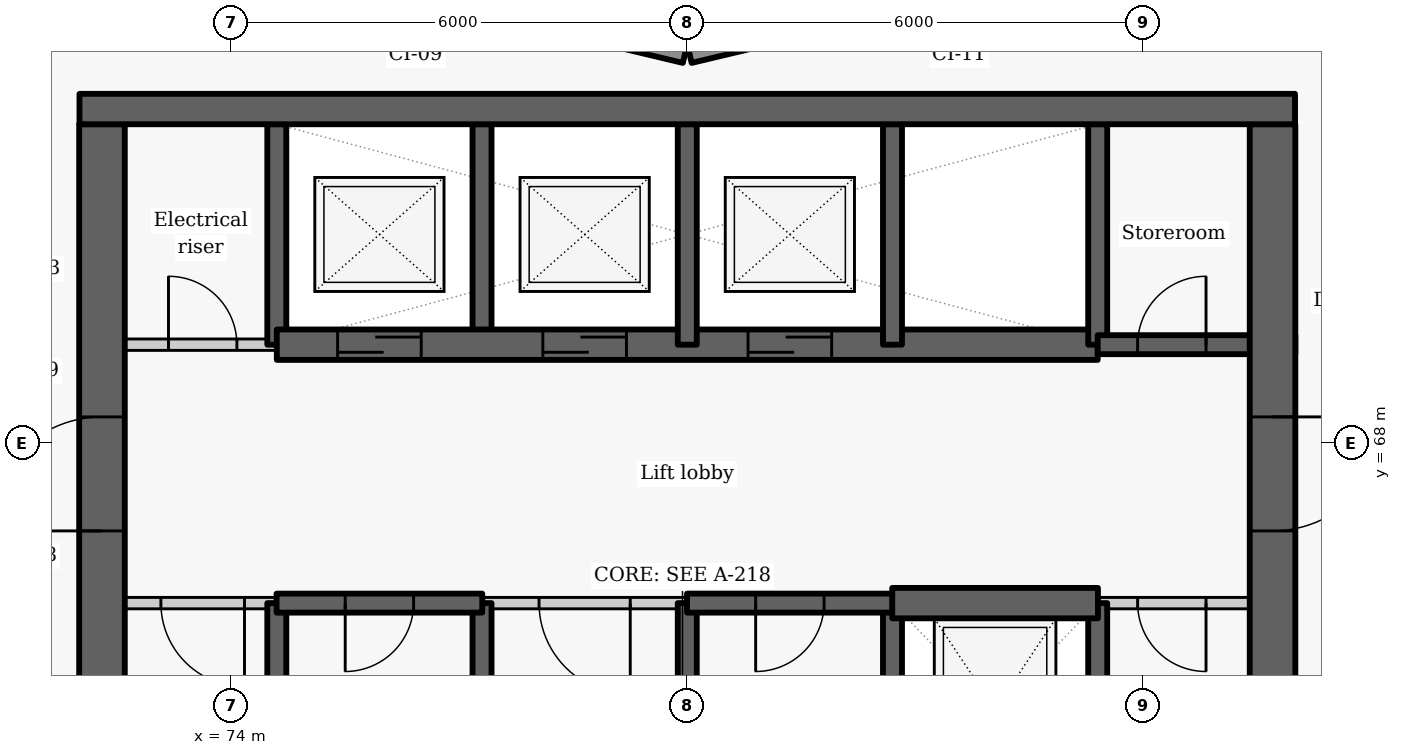
"""IFC4 building model, lengths in metres.
Left out: names, types, materials, properties, quantities, classifications, styles, units other than length and angle.
Written with IfcOpenShell. Run it as: python <this file> out.ifc"""

import sys

from ifc_helpers import new_model, si_unit, direction, frame, frame_2d, origin, place, context, subcontext, project, spatial, rectangle, extrude, element, fill, save


model = new_model("IFC4")
c1 = context("Model", 3, precision=1e-05, world=origin(), true_north=direction((0.0, 1.0)))
c2 = subcontext(c1, "Body", "Model", "MODEL_VIEW")
j1 = project(units=[si_unit("LENGTHUNIT", "METRE"), si_unit("PLANEANGLEUNIT", "RADIAN")], contexts=[c1])
p1 = place(None, origin())
s1 = spatial("IfcSite", under=j1, at=p1, CompositionType="ELEMENT")
p2 = place(p1, origin())
s2 = spatial("IfcBuilding", under=s1, at=p2, CompositionType="ELEMENT")
p3 = place(p2, frame((0.0, 0.0, 87.6)))
s3 = spatial("IfcBuildingStorey", under=s2, at=p3, CompositionType="ELEMENT", Elevation=87.6)
for number, where, z_axis, x_axis in (
    (1, (83.186, 73.881, 0.0), (0.0, 0.0, 1.0), (-0.973, -0.232, 0.0)),
    (2, (79.971, 73.128, 0.0), (0.0, 0.0, 1.0), (-0.973, 0.232, 0.0)),
):
    element("IfcWall", number, at=place(p3, frame(where, z_axis=z_axis, x_axis=x_axis)), inside=s3, PredefinedType="SOLIDWALL", context=c2, shape_type="SweptSolid", body=[
        extrude(rectangle(XDim=3.246, YDim=0.25, at=frame_2d((1.623, 0.0))), origin(), (0.0, 0.0, 1.0), 2.425),
    ])
p4 = place(p3, frame((74.6, 63.1, -0.275), z_axis=(0.0, 0.0, 1.0), x_axis=(0.0, 1.0, 0.0)))
e3 = element("IfcWall", 3, at=p4, inside=s3, PredefinedType="SHEAR", context=c2, shape_type="SweptSolid", body=[
    extrude(rectangle(XDim=2.8, YDim=0.25, at=frame_2d((1.4, 0.0))), origin(), (0.0, 0.0, 1.0), 3.3),
])
p5 = place(p3, frame((74.6, 69.3, -0.275), z_axis=(0.0, 0.0, 1.0), x_axis=(0.0, 1.0, 0.0)))
e4 = element("IfcWall", 4, at=p5, inside=s3, PredefinedType="SHEAR", context=c2, shape_type="SweptSolid", body=[
    extrude(rectangle(XDim=2.9, YDim=0.25, at=frame_2d((1.45, 0.0))), origin(), (0.0, 0.0, 1.0), 3.3),
])
p6 = place(p3, frame((72.0, 69.3, 0.0), z_axis=(0.0, 0.0, 1.0), x_axis=(1.0, 0.0, 0.0)))
e5 = element("IfcWall", 5, at=p6, inside=s3, PredefinedType="PARTITIONING", context=c2, shape_type="SweptSolid", body=[
    extrude(rectangle(XDim=2.6, YDim=0.15, at=frame_2d((1.3, 0.0))), origin(), (0.0, 0.0, 1.0), 3.025),
])
p7 = place(p6, frame((1.175, 0.0, 0.0)))
e6 = element("IfcOpeningElement", 6, at=p7, cuts=e5, PredefinedType="OPENING", context=c2, shape_type="SweptSolid", body=[
    extrude(rectangle(XDim=0.9, YDim=2.1, at=frame_2d((0.45, 1.05))), frame((0.0, 0.085, 0.0), z_axis=(0.0, -1.0, 0.0), x_axis=(1.0, 0.0, 0.0)), (0.0, 0.0, 1.0), 0.17),
])
p8 = place(p3, frame((72.3, 63.1, -0.275), z_axis=(0.0, 0.0, 1.0), x_axis=(0.0, 1.0, 0.0)))
e7 = element("IfcWall", 7, at=p8, inside=s3, PredefinedType="SHEAR", context=c2, shape_type="SweptSolid", body=[
    extrude(rectangle(XDim=9.1, YDim=0.6, at=frame_2d((4.55, 0.0))), origin(), (0.0, 0.0, 1.0), 3.3),
])
p9 = place(p8, frame((3.75, 0.0, 0.275)))
e8 = element("IfcOpeningElement", 8, at=p9, cuts=e7, PredefinedType="OPENING", context=c2, shape_type="SweptSolid", body=[
    extrude(rectangle(XDim=1.5, YDim=2.1, at=frame_2d((0.75, 1.05))), frame((0.0, 0.31, 0.0), z_axis=(0.0, -1.0, 0.0), x_axis=(1.0, 0.0, 0.0)), (0.0, 0.0, 1.0), 0.62),
])
p10 = place(p3, frame((77.3, 63.1, -0.275), z_axis=(0.0, 0.0, 1.0), x_axis=(0.0, 1.0, 0.0)))
e9 = element("IfcWall", 9, at=p10, inside=s3, PredefinedType="SHEAR", context=c2, shape_type="SweptSolid", body=[
    extrude(rectangle(XDim=2.8, YDim=0.25, at=frame_2d((1.4, 0.0))), origin(), (0.0, 0.0, 1.0), 3.3),
])
p11 = place(p3, frame((77.3, 69.3, -0.275), z_axis=(0.0, 0.0, 1.0), x_axis=(0.0, 1.0, 0.0)))
e10 = element("IfcWall", 10, at=p11, inside=s3, PredefinedType="SHEAR", context=c2, shape_type="SweptSolid", body=[
    extrude(rectangle(XDim=2.9, YDim=0.25, at=frame_2d((1.45, 0.0))), origin(), (0.0, 0.0, 1.0), 3.3),
])
p12 = place(p3, frame((74.6, 69.3, -0.275), z_axis=(0.0, 0.0, 1.0), x_axis=(1.0, 0.0, 0.0)))
e11 = element("IfcWall", 11, at=p12, inside=s3, PredefinedType="SHEAR", context=c2, shape_type="SweptSolid", body=[
    extrude(rectangle(XDim=10.8, YDim=0.4, at=frame_2d((5.4, 0.0))), origin(), (0.0, 0.0, 1.0), 3.3),
])
p13 = place(p12, frame((0.8, 0.0, 0.275)))
e12 = element("IfcOpeningElement", 12, at=p13, cuts=e11, PredefinedType="OPENING", context=c2, shape_type="SweptSolid", body=[
    extrude(rectangle(XDim=1.1, YDim=2.1, at=frame_2d((0.55, 1.05))), frame((0.0, 0.21, 0.0), z_axis=(0.0, -1.0, 0.0), x_axis=(1.0, 0.0, 0.0)), (0.0, 0.0, 1.0), 0.42),
])
p14 = place(p12, frame((3.5, 0.0, 0.275)))
e13 = element("IfcOpeningElement", 13, at=p14, cuts=e11, PredefinedType="OPENING", context=c2, shape_type="SweptSolid", body=[
    extrude(rectangle(XDim=1.1, YDim=2.1, at=frame_2d((0.55, 1.05))), frame((0.0, 0.21, 0.0), z_axis=(0.0, -1.0, 0.0), x_axis=(1.0, 0.0, 0.0)), (0.0, 0.0, 1.0), 0.42),
])
p15 = place(p12, frame((6.2, 0.0, 0.275)))
e14 = element("IfcOpeningElement", 14, at=p15, cuts=e11, PredefinedType="OPENING", context=c2, shape_type="SweptSolid", body=[
    extrude(rectangle(XDim=1.1, YDim=2.1, at=frame_2d((0.55, 1.05))), frame((0.0, 0.21, 0.0), z_axis=(0.0, -1.0, 0.0), x_axis=(1.0, 0.0, 0.0)), (0.0, 0.0, 1.0), 0.42),
])
p16 = place(p3, frame((80.0, 63.1, -0.275), z_axis=(0.0, 0.0, 1.0), x_axis=(0.0, 1.0, 0.0)))
e15 = element("IfcWall", 15, at=p16, inside=s3, PredefinedType="SHEAR", context=c2, shape_type="SweptSolid", body=[
    extrude(rectangle(XDim=2.8, YDim=0.25, at=frame_2d((1.4, 0.0))), origin(), (0.0, 0.0, 1.0), 3.3),
])
p17 = place(p3, frame((80.0, 69.3, -0.275), z_axis=(0.0, 0.0, 1.0), x_axis=(0.0, 1.0, 0.0)))
e16 = element("IfcWall", 16, at=p17, inside=s3, PredefinedType="SHEAR", context=c2, shape_type="SweptSolid", body=[
    extrude(rectangle(XDim=2.9, YDim=0.25, at=frame_2d((1.45, 0.0))), origin(), (0.0, 0.0, 1.0), 3.3),
])
p18 = place(p3, frame((82.7, 63.1, -0.275), z_axis=(0.0, 0.0, 1.0), x_axis=(0.0, 1.0, 0.0)))
e17 = element("IfcWall", 17, at=p18, inside=s3, PredefinedType="SHEAR", context=c2, shape_type="SweptSolid", body=[
    extrude(rectangle(XDim=2.8, YDim=0.25, at=frame_2d((1.4, 0.0))), origin(), (0.0, 0.0, 1.0), 3.3),
])
p19 = place(p3, frame((82.7, 69.3, -0.275), z_axis=(0.0, 0.0, 1.0), x_axis=(0.0, 1.0, 0.0)))
e18 = element("IfcWall", 18, at=p19, inside=s3, PredefinedType="SHEAR", context=c2, shape_type="SweptSolid", body=[
    extrude(rectangle(XDim=2.9, YDim=0.25, at=frame_2d((1.45, 0.0))), origin(), (0.0, 0.0, 1.0), 3.3),
])
p20 = place(p3, frame((85.4, 63.1, -0.275), z_axis=(0.0, 0.0, 1.0), x_axis=(0.0, 1.0, 0.0)))
e19 = element("IfcWall", 19, at=p20, inside=s3, PredefinedType="SHEAR", context=c2, shape_type="SweptSolid", body=[
    extrude(rectangle(XDim=2.8, YDim=0.25, at=frame_2d((1.4, 0.0))), origin(), (0.0, 0.0, 1.0), 3.3),
])
p21 = place(p3, frame((85.4, 69.3, -0.275), z_axis=(0.0, 0.0, 1.0), x_axis=(0.0, 1.0, 0.0)))
e20 = element("IfcWall", 20, at=p21, inside=s3, PredefinedType="SHEAR", context=c2, shape_type="SweptSolid", body=[
    extrude(rectangle(XDim=2.9, YDim=0.25, at=frame_2d((1.45, 0.0))), origin(), (0.0, 0.0, 1.0), 3.3),
])
p22 = place(p3, frame((85.4, 69.3, -0.275), z_axis=(0.0, 0.0, 1.0), x_axis=(1.0, 0.0, 0.0)))
e21 = element("IfcWall", 21, at=p22, inside=s3, PredefinedType="SHEAR", context=c2, shape_type="SweptSolid", body=[
    extrude(rectangle(XDim=2.6, YDim=0.25, at=frame_2d((1.3, 0.0))), origin(), (0.0, 0.0, 1.0), 3.3),
])
p23 = place(p22, frame((0.525, 0.0, 0.275)))
e22 = element("IfcOpeningElement", 22, at=p23, cuts=e21, PredefinedType="OPENING", context=c2, shape_type="SweptSolid", body=[
    extrude(rectangle(XDim=0.9, YDim=2.1, at=frame_2d((0.45, 1.05))), frame((0.0, 0.135, 0.0), z_axis=(0.0, -1.0, 0.0), x_axis=(1.0, 0.0, 0.0)), (0.0, 0.0, 1.0), 0.27),
])
p24 = place(p3, frame((87.7, 72.2, -0.275), z_axis=(0.0, 0.0, 1.0), x_axis=(0.0, -1.0, 0.0)))
e23 = element("IfcWall", 23, at=p24, inside=s3, PredefinedType="SHEAR", context=c2, shape_type="SweptSolid", body=[
    extrude(rectangle(XDim=15.6, YDim=0.6, at=frame_2d((7.8, 0.0))), origin(), (0.0, 0.0, 1.0), 3.3),
])
p25 = place(p24, frame((3.85, 0.0, 0.275)))
e24 = element("IfcOpeningElement", 24, at=p25, cuts=e23, PredefinedType="OPENING", context=c2, shape_type="SweptSolid", body=[
    extrude(rectangle(XDim=1.5, YDim=2.1, at=frame_2d((0.75, 1.05))), frame((0.0, 0.31, 0.0), z_axis=(0.0, -1.0, 0.0), x_axis=(1.0, 0.0, 0.0)), (0.0, 0.0, 1.0), 0.62),
])
p26 = place(p24, frame((11.8, 0.0, 0.275)))
e25 = element("IfcOpeningElement", 25, at=p26, cuts=e23, PredefinedType="OPENING", context=c2, shape_type="SweptSolid", body=[
    extrude(rectangle(XDim=1.1, YDim=2.1, at=frame_2d((0.55, 1.05))), frame((0.0, 0.31, 0.0), z_axis=(0.0, -1.0, 0.0), x_axis=(1.0, 0.0, 0.0)), (0.0, 0.0, 1.0), 0.62),
])
p27 = place(p3, frame((74.603, 65.9, 0.0), z_axis=(0.0, 0.0, 1.0), x_axis=(-1.0, 0.0, 0.0)))
e26 = element("IfcWall", 26, at=p27, inside=s3, PredefinedType="PARTITIONING", context=c2, shape_type="SweptSolid", body=[
    extrude(rectangle(XDim=2.603, YDim=0.15, at=frame_2d((1.302, 0.0))), origin(), (0.0, 0.0, 1.0), 3.025),
])
p28 = place(p27, frame((0.428, 0.0, 0.0)))
e27 = element("IfcOpeningElement", 27, at=p28, cuts=e26, PredefinedType="OPENING", context=c2, shape_type="SweptSolid", body=[
    extrude(rectangle(XDim=1.1, YDim=2.1, at=frame_2d((0.55, 1.05))), frame((0.0, 0.085, 0.0), z_axis=(0.0, -1.0, 0.0), x_axis=(1.0, 0.0, 0.0)), (0.0, 0.0, 1.0), 0.17),
])
p29 = place(p3, frame((80.003, 65.9, 0.0), z_axis=(0.0, 0.0, 1.0), x_axis=(-1.0, 0.0, 0.0)))
e28 = element("IfcWall", 28, at=p29, inside=s3, PredefinedType="PARTITIONING", context=c2, shape_type="SweptSolid", body=[
    extrude(rectangle(XDim=2.706, YDim=0.15, at=frame_2d((1.353, 0.0))), origin(), (0.0, 0.0, 1.0), 3.025),
])
p30 = place(p29, frame((0.753, 0.0, 0.0)))
e29 = element("IfcOpeningElement", 29, at=p30, cuts=e28, PredefinedType="OPENING", context=c2, shape_type="SweptSolid", body=[
    extrude(rectangle(XDim=1.2, YDim=2.1, at=frame_2d((0.6, 1.05))), frame((0.0, 0.085, 0.0), z_axis=(0.0, -1.0, 0.0), x_axis=(1.0, 0.0, 0.0)), (0.0, 0.0, 1.0), 0.17),
])
p31 = place(p3, frame((88.0, 65.9, 0.0), z_axis=(0.0, 0.0, 1.0), x_axis=(-1.0, 0.0, 0.0)))
e30 = element("IfcWall", 30, at=p31, inside=s3, PredefinedType="PARTITIONING", context=c2, shape_type="SweptSolid", body=[
    extrude(rectangle(XDim=2.603, YDim=0.15, at=frame_2d((1.302, 0.0))), origin(), (0.0, 0.0, 1.0), 3.025),
])
p32 = place(p31, frame((1.175, 0.0, 0.0)))
e31 = element("IfcOpeningElement", 31, at=p32, cuts=e30, PredefinedType="OPENING", context=c2, shape_type="SweptSolid", body=[
    extrude(rectangle(XDim=0.9, YDim=2.1, at=frame_2d((0.45, 1.05))), frame((0.0, 0.085, 0.0), z_axis=(0.0, -1.0, 0.0), x_axis=(1.0, 0.0, 0.0)), (0.0, 0.0, 1.0), 0.17),
])
p33 = place(p3, frame((77.303, 65.9, -0.275), z_axis=(0.0, 0.0, 1.0), x_axis=(-1.0, 0.0, 0.0)))
e32 = element("IfcWall", 32, at=p33, inside=s3, PredefinedType="SHEAR", context=c2, shape_type="SweptSolid", body=[
    extrude(rectangle(XDim=2.706, YDim=0.25, at=frame_2d((1.353, 0.0))), origin(), (0.0, 0.0, 1.0), 3.3),
])
p34 = place(p33, frame((0.903, 0.0, 0.275)))
e33 = element("IfcOpeningElement", 33, at=p34, cuts=e32, PredefinedType="OPENING", context=c2, shape_type="SweptSolid", body=[
    extrude(rectangle(XDim=0.9, YDim=2.1, at=frame_2d((0.45, 1.05))), frame((0.0, 0.135, 0.0), z_axis=(0.0, -1.0, 0.0), x_axis=(1.0, 0.0, 0.0)), (0.0, 0.0, 1.0), 0.27),
])
p35 = place(p3, frame((82.703, 65.9, -0.275), z_axis=(0.0, 0.0, 1.0), x_axis=(-1.0, 0.0, 0.0)))
e34 = element("IfcWall", 34, at=p35, inside=s3, PredefinedType="SHEAR", context=c2, shape_type="SweptSolid", body=[
    extrude(rectangle(XDim=2.706, YDim=0.25, at=frame_2d((1.353, 0.0))), origin(), (0.0, 0.0, 1.0), 3.3),
])
p36 = place(p35, frame((0.903, 0.0, 0.275)))
e35 = element("IfcOpeningElement", 35, at=p36, cuts=e34, PredefinedType="OPENING", context=c2, shape_type="SweptSolid", body=[
    extrude(rectangle(XDim=0.9, YDim=2.1, at=frame_2d((0.45, 1.05))), frame((0.0, 0.135, 0.0), z_axis=(0.0, -1.0, 0.0), x_axis=(1.0, 0.0, 0.0)), (0.0, 0.0, 1.0), 0.27),
])
p37 = place(p3, frame((82.697, 65.9, -0.275), z_axis=(0.0, 0.0, 1.0), x_axis=(1.0, 0.0, 0.0)))
e36 = element("IfcWall", 36, at=p37, inside=s3, PredefinedType="SHEAR", context=c2, shape_type="SweptSolid", body=[
    extrude(rectangle(XDim=2.706, YDim=0.4, at=frame_2d((1.353, 0.0))), origin(), (0.0, 0.0, 1.0), 3.3),
])
p38 = place(p3, frame((72.004, 72.4, -0.275), z_axis=(0.0, 0.0, 1.0), x_axis=(1.0, 0.0, 0.0)))
e37 = element("IfcWall", 37, at=p38, inside=s3, PredefinedType="SHEAR", context=c2, shape_type="SweptSolid", body=[
    extrude(rectangle(XDim=15.992, YDim=0.4, at=frame_2d((7.996, 0.0))), origin(), (0.0, 0.0, 1.0), 3.3),
])
p39 = place(p7, origin())
e38 = element("IfcDoor", 38, at=p39, inside=s3, OperationType="SINGLE_SWING_LEFT", PredefinedType="DOOR", context=c2, shape_type="SweptSolid", body=[
    extrude(rectangle(XDim=0.9, YDim=2.1, at=frame_2d((0.45, 1.05))), frame((0.0, 0.025, 0.0), z_axis=(0.0, -1.0, 0.0), x_axis=(1.0, 0.0, 0.0)), (0.0, 0.0, 1.0), 0.05),
])
fill(e6, e38)
p40 = place(p13, origin())
e39 = element("IfcDoor", 39, at=p40, inside=s3, OperationType="SLIDING_TO_LEFT", PredefinedType="DOOR", context=c2, shape_type="SweptSolid", body=[
    extrude(rectangle(XDim=1.1, YDim=2.1, at=frame_2d((0.55, 1.05))), frame((0.0, 0.025, 0.0), z_axis=(0.0, -1.0, 0.0), x_axis=(1.0, 0.0, 0.0)), (0.0, 0.0, 1.0), 0.05),
])
fill(e12, e39)
p41 = place(p14, origin())
e40 = element("IfcDoor", 40, at=p41, inside=s3, OperationType="SLIDING_TO_LEFT", PredefinedType="DOOR", context=c2, shape_type="SweptSolid", body=[
    extrude(rectangle(XDim=1.1, YDim=2.1, at=frame_2d((0.55, 1.05))), frame((0.0, 0.025, 0.0), z_axis=(0.0, -1.0, 0.0), x_axis=(1.0, 0.0, 0.0)), (0.0, 0.0, 1.0), 0.05),
])
fill(e13, e40)
p42 = place(p15, origin())
e41 = element("IfcDoor", 41, at=p42, inside=s3, OperationType="SLIDING_TO_LEFT", PredefinedType="DOOR", context=c2, shape_type="SweptSolid", body=[
    extrude(rectangle(XDim=1.1, YDim=2.1, at=frame_2d((0.55, 1.05))), frame((0.0, 0.025, 0.0), z_axis=(0.0, -1.0, 0.0), x_axis=(1.0, 0.0, 0.0)), (0.0, 0.0, 1.0), 0.05),
])
fill(e14, e41)
p43 = place(p23, origin())
e42 = element("IfcDoor", 42, at=p43, inside=s3, OperationType="SINGLE_SWING_RIGHT", PredefinedType="DOOR", context=c2, shape_type="SweptSolid", body=[
    extrude(rectangle(XDim=0.9, YDim=2.1, at=frame_2d((0.45, 1.05))), frame((0.0, 0.025, 0.0), z_axis=(0.0, -1.0, 0.0), x_axis=(1.0, 0.0, 0.0)), (0.0, 0.0, 1.0), 0.05),
])
fill(e22, e42)
p44 = place(p28, origin())
e43 = element("IfcDoor", 43, at=p44, inside=s3, OperationType="SINGLE_SWING_LEFT", PredefinedType="DOOR", context=c2, shape_type="SweptSolid", body=[
    extrude(rectangle(XDim=1.1, YDim=2.1, at=frame_2d((0.55, 1.05))), frame((0.0, 0.025, 0.0), z_axis=(0.0, -1.0, 0.0), x_axis=(1.0, 0.0, 0.0)), (0.0, 0.0, 1.0), 0.05),
])
fill(e27, e43)
p45 = place(p34, origin())
e44 = element("IfcDoor", 44, at=p45, inside=s3, OperationType="SINGLE_SWING_RIGHT", PredefinedType="DOOR", context=c2, shape_type="SweptSolid", body=[
    extrude(rectangle(XDim=0.9, YDim=2.1, at=frame_2d((0.45, 1.05))), frame((0.0, 0.025, 0.0), z_axis=(0.0, -1.0, 0.0), x_axis=(1.0, 0.0, 0.0)), (0.0, 0.0, 1.0), 0.05),
])
fill(e33, e44)
p46 = place(p30, origin())
e45 = element("IfcDoor", 45, at=p46, inside=s3, OperationType="DOUBLE_DOOR_SINGLE_SWING", PredefinedType="DOOR", context=c2, shape_type="SweptSolid", body=[
    extrude(rectangle(XDim=1.2, YDim=2.1, at=frame_2d((0.6, 1.05))), frame((0.0, 0.025, 0.0), z_axis=(0.0, -1.0, 0.0), x_axis=(1.0, 0.0, 0.0)), (0.0, 0.0, 1.0), 0.05),
])
fill(e29, e45)
p47 = place(p36, origin())
e46 = element("IfcDoor", 46, at=p47, inside=s3, OperationType="SINGLE_SWING_RIGHT", PredefinedType="DOOR", context=c2, shape_type="SweptSolid", body=[
    extrude(rectangle(XDim=0.9, YDim=2.1, at=frame_2d((0.45, 1.05))), frame((0.0, 0.025, 0.0), z_axis=(0.0, -1.0, 0.0), x_axis=(1.0, 0.0, 0.0)), (0.0, 0.0, 1.0), 0.05),
])
fill(e35, e46)
p48 = place(p32, origin())
e47 = element("IfcDoor", 47, at=p48, inside=s3, OperationType="SINGLE_SWING_LEFT", PredefinedType="DOOR", context=c2, shape_type="SweptSolid", body=[
    extrude(rectangle(XDim=0.9, YDim=2.1, at=frame_2d((0.45, 1.05))), frame((0.0, 0.025, 0.0), z_axis=(0.0, -1.0, 0.0), x_axis=(1.0, 0.0, 0.0)), (0.0, 0.0, 1.0), 0.05),
])
fill(e31, e47)
p49 = place(p25, origin())
e48 = element("IfcDoor", 48, at=p49, inside=s3, OperationType="DOUBLE_DOOR_SINGLE_SWING", PredefinedType="DOOR", context=c2, shape_type="SweptSolid", body=[
    extrude(rectangle(XDim=1.5, YDim=2.1, at=frame_2d((0.75, 1.05))), frame((0.0, 0.025, 0.0), z_axis=(0.0, -1.0, 0.0), x_axis=(1.0, 0.0, 0.0)), (0.0, 0.0, 1.0), 0.05),
])
fill(e24, e48)
p50 = place(p9, origin())
e49 = element("IfcDoor", 49, at=p50, inside=s3, OperationType="DOUBLE_DOOR_SINGLE_SWING", PredefinedType="DOOR", context=c2, shape_type="SweptSolid", body=[
    extrude(rectangle(XDim=1.5, YDim=2.1, at=frame_2d((0.75, 1.05))), frame((0.0, 0.025, 0.0), z_axis=(0.0, -1.0, 0.0), x_axis=(1.0, 0.0, 0.0)), (0.0, 0.0, 1.0), 0.05),
])
fill(e8, e49)
save(model, sys.argv[1])
